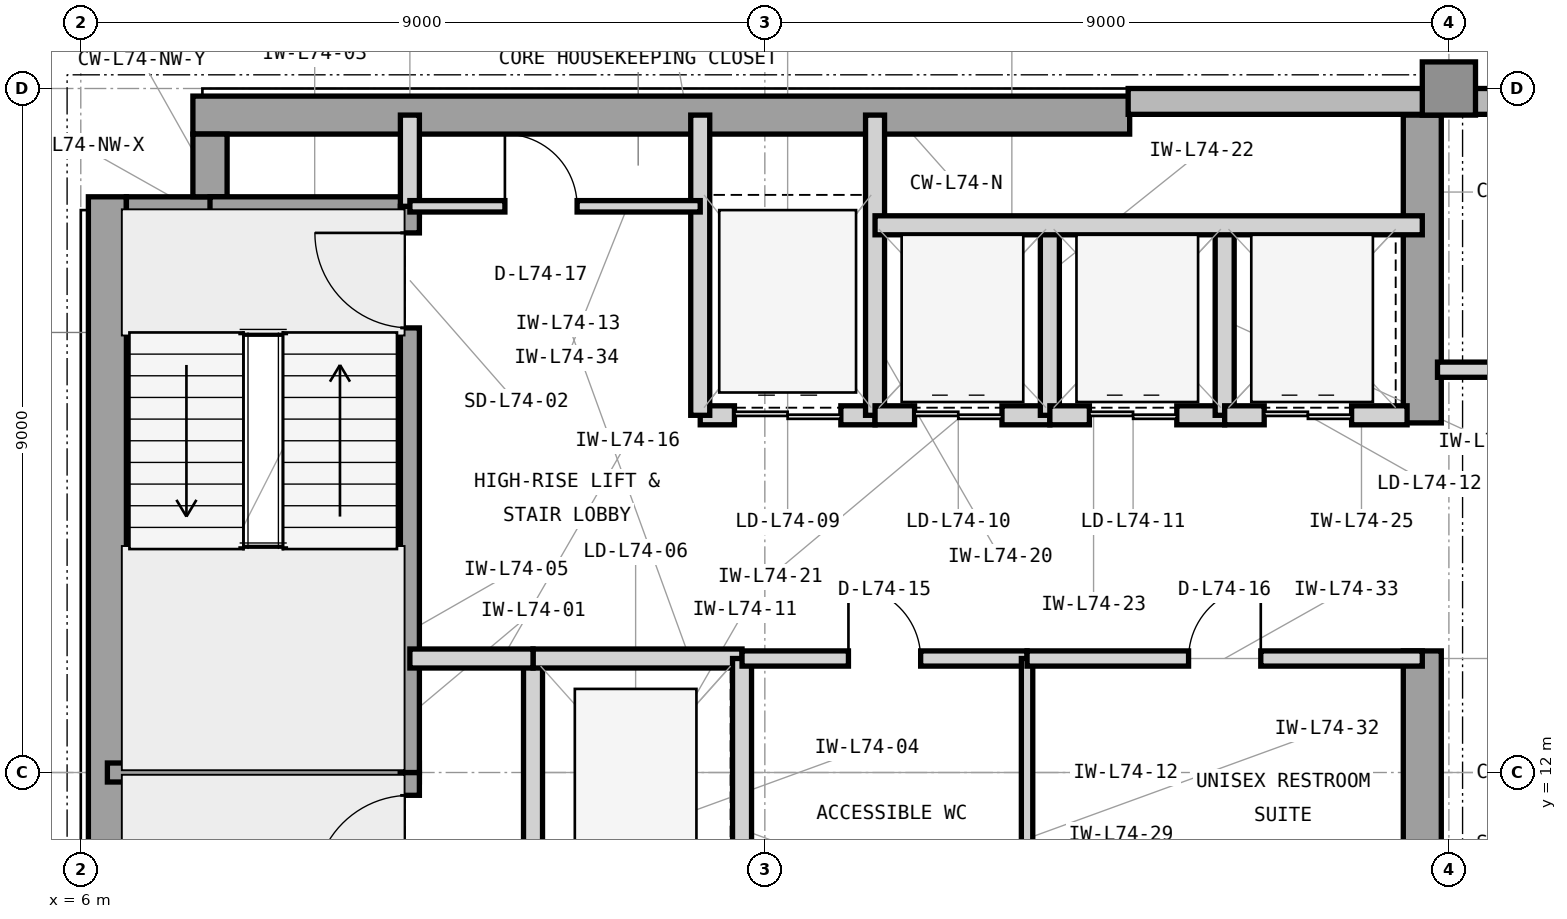
"""IFC4 building model, lengths in metres.
Left out: names, types, materials, properties, quantities, classifications, styles, units other than length and angle.
Written with IfcOpenShell. Run it as: python <this file> out.ifc"""

import sys

from ifc_helpers import new_model, si_unit, direction, frame, frame_2d, origin, origin_2d, place, context, subcontext, project, spatial, rectangle, extrude, element, fill, save


model = new_model("IFC4")
c1 = context("Model", 3, precision=1e-05, world=origin(), true_north=direction((0.0, 1.0)))
c2 = subcontext(c1, "Body", "Model", "MODEL_VIEW")
j1 = project(units=[si_unit("LENGTHUNIT", "METRE"), si_unit("PLANEANGLEUNIT", "RADIAN")], contexts=[c1])
p1 = place(None, origin())
s1 = spatial("IfcSite", under=j1, at=p1, CompositionType="ELEMENT")
p2 = place(p1, origin())
s2 = spatial("IfcBuilding", under=s1, at=p2, CompositionType="ELEMENT")
p3 = place(p2, frame((0.0, 0.0, 301.5)))
s3 = spatial("IfcBuildingStorey", under=s2, at=p3, CompositionType="ELEMENT", Elevation=301.5)
p4 = place(p3, frame((6.35, 4.425, 0.0), z_axis=(0.0, 0.0, 1.0), x_axis=(0.0, 1.0, 0.0)))
e1 = element("IfcWall", 1, at=p4, inside=s3, PredefinedType="SHEAR", context=c2, shape_type="SweptSolid", body=[
    extrude(rectangle(XDim=15.15, YDim=0.5, at=frame_2d((7.575, 0.0))), origin(), (0.0, 0.0, 1.0), 3.9),
])
p5 = place(p3, frame((7.475, 20.65, 0.0), z_axis=(0.0, 0.0, 1.0), x_axis=(1.0, 0.0, 0.0)))
e2 = element("IfcWall", 2, at=p5, inside=s3, PredefinedType="SHEAR", context=c2, shape_type="SweptSolid", body=[
    extrude(rectangle(XDim=12.325, YDim=0.5, at=frame_2d((6.163, 0.0))), origin(), (0.0, 0.0, 1.0), 3.9),
])
p6 = place(p3, frame((23.65, 10.4, 0.0), z_axis=(0.0, 0.0, 1.0), x_axis=(0.0, 1.0, 0.0)))
e3 = element("IfcWall", 3, at=p6, inside=s3, PredefinedType="SHEAR", context=c2, shape_type="SweptSolid", body=[
    extrude(rectangle(XDim=3.2, YDim=0.5, at=frame_2d((1.6, 0.0))), origin(), (0.0, 0.0, 1.0), 3.9),
])
p7 = place(p3, frame((23.65, 16.6, 0.0), z_axis=(0.0, 0.0, 1.0), x_axis=(0.0, 1.0, 0.0)))
e4 = element("IfcWall", 4, at=p7, inside=s3, PredefinedType="SHEAR", context=c2, shape_type="SweptSolid", body=[
    extrude(rectangle(XDim=4.05, YDim=0.5, at=frame_2d((2.025, 0.0))), origin(), (0.0, 0.0, 1.0), 3.9),
])
p8 = place(p3, frame((6.6, 19.35, 0.0), z_axis=(0.0, 0.0, 1.0), x_axis=(1.0, 0.0, 0.0)))
e5 = element("IfcWall", 5, at=p8, inside=s3, PredefinedType="SHEAR", context=c2, shape_type="SweptSolid", body=[
    extrude(rectangle(XDim=1.325, YDim=0.45, at=frame_2d((0.663, 0.0))), origin(), (0.0, 0.0, 1.0), 3.9),
])
p9 = place(p3, frame((7.7, 19.575, 0.0), z_axis=(0.0, 0.0, 1.0), x_axis=(0.0, 1.0, 0.0)))
e6 = element("IfcWall", 6, at=p9, inside=s3, PredefinedType="SHEAR", context=c2, shape_type="SweptSolid", body=[
    extrude(rectangle(XDim=0.825, YDim=0.45, at=frame_2d((0.413, 0.0))), origin(), (0.0, 0.0, 1.0), 3.9),
])
p10 = place(p3, frame((24.0, 21.0, 0.0), z_axis=(0.0, 0.0, 1.0), x_axis=(1.0, 0.0, 0.0)))
e7 = element("IfcColumn", 7, at=p10, inside=s3, PredefinedType="COLUMN", context=c2, shape_type="SweptSolid", body=[
    extrude(rectangle(XDim=0.7, YDim=0.7, at=origin_2d()), origin(), (0.0, 0.0, 1.0), 3.9),
])
p11 = place(p3, frame((49.4, 20.83, 0.0), z_axis=(0.0, 0.0, 1.0), x_axis=(-1.0, 0.0, 0.0)))
e8 = element("IfcWall", 8, at=p11, inside=s3, PredefinedType="STANDARD", context=c2, shape_type="SweptSolid", body=[
    extrude(rectangle(XDim=29.62, YDim=0.34, at=frame_2d((14.81, 0.0))), origin(), (0.0, 0.0, 1.0), 3.715),
])
p12 = place(p11, frame((11.042, 0.0, 0.8)))
e9 = element("IfcOpeningElement", 9, at=p12, cuts=e8, PredefinedType="OPENING", context=c2, shape_type="SweptSolid", body=[
    extrude(rectangle(XDim=2.6, YDim=2.35, at=frame_2d((1.3, 1.175))), frame((0.0, 0.18, 0.0), z_axis=(0.0, -1.0, 0.0), x_axis=(1.0, 0.0, 0.0)), (0.0, 0.0, 1.0), 0.36),
])
p13 = place(p11, frame((20.915, 0.0, 0.8)))
e10 = element("IfcOpeningElement", 10, at=p13, cuts=e8, PredefinedType="OPENING", context=c2, shape_type="SweptSolid", body=[
    extrude(rectangle(XDim=2.6, YDim=2.35, at=frame_2d((1.3, 1.175))), frame((0.0, 0.18, 0.0), z_axis=(0.0, -1.0, 0.0), x_axis=(1.0, 0.0, 0.0)), (0.0, 0.0, 1.0), 0.36),
])
p14 = place(p11, frame((7.925, 0.0, 0.8)))
e11 = element("IfcOpeningElement", 11, at=p14, cuts=e8, PredefinedType="OPENING", context=c2, shape_type="SweptSolid", body=[
    extrude(rectangle(XDim=1.9, YDim=2.35, at=frame_2d((0.95, 1.175))), frame((0.0, 0.18, 0.0), z_axis=(0.0, -1.0, 0.0), x_axis=(1.0, 0.0, 0.0)), (0.0, 0.0, 1.0), 0.36),
])
p15 = place(p3, frame((6.35, 12.0, 0.0), z_axis=(0.0, 0.0, 1.0), x_axis=(1.0, 0.0, 0.0)))
e12 = element("IfcWall", 12, at=p15, inside=s3, PredefinedType="SHEAR", context=c2, shape_type="SweptSolid", body=[
    extrude(rectangle(XDim=4.105, YDim=0.25, at=frame_2d((2.052, 0.0))), origin(), (0.0, 0.0, 1.0), 3.9),
])
p16 = place(p3, frame((7.7, 19.45, 0.0), z_axis=(0.0, 0.0, 1.0), x_axis=(1.0, 0.0, 0.0)))
e13 = element("IfcWall", 13, at=p16, inside=s3, PredefinedType="SHEAR", context=c2, shape_type="SweptSolid", body=[
    extrude(rectangle(XDim=2.755, YDim=0.25, at=frame_2d((1.377, 0.0))), origin(), (0.0, 0.0, 1.0), 3.9),
])
p17 = place(p3, frame((10.33, 4.55, 0.0), z_axis=(0.0, 0.0, 1.0), x_axis=(0.0, 1.0, 0.0)))
e14 = element("IfcWall", 14, at=p17, inside=s3, PredefinedType="SHEAR", context=c2, shape_type="SweptSolid", body=[
    extrude(rectangle(XDim=7.45, YDim=0.25, at=frame_2d((3.725, 0.0))), origin(), (0.0, 0.0, 1.0), 3.9),
])
p18 = place(p17, frame((5.9, 0.0, 0.0)))
e15 = element("IfcOpeningElement", 15, at=p18, cuts=e14, PredefinedType="OPENING", context=c2, shape_type="SweptSolid", body=[
    extrude(rectangle(XDim=1.25, YDim=2.2, at=frame_2d((0.625, 1.1))), frame((0.0, 0.135, 0.0), z_axis=(0.0, -1.0, 0.0), x_axis=(1.0, 0.0, 0.0)), (0.0, 0.0, 1.0), 0.27),
])
p19 = place(p3, frame((10.33, 12.0, 0.0), z_axis=(0.0, 0.0, 1.0), x_axis=(0.0, 1.0, 0.0)))
e16 = element("IfcWall", 16, at=p19, inside=s3, PredefinedType="SHEAR", context=c2, shape_type="SweptSolid", body=[
    extrude(rectangle(XDim=7.45, YDim=0.25, at=frame_2d((3.725, 0.0))), origin(), (0.0, 0.0, 1.0), 3.9),
])
p20 = place(p19, frame((5.85, 0.0, 0.0)))
e17 = element("IfcOpeningElement", 17, at=p20, cuts=e16, PredefinedType="OPENING", context=c2, shape_type="SweptSolid", body=[
    extrude(rectangle(XDim=1.25, YDim=2.2, at=frame_2d((0.625, 1.1))), frame((0.0, 0.135, 0.0), z_axis=(0.0, -1.0, 0.0), x_axis=(1.0, 0.0, 0.0)), (0.0, 0.0, 1.0), 0.27),
])
p21 = place(p3, frame((10.33, 19.45, 0.0), z_axis=(0.0, 0.0, 1.0), x_axis=(0.0, 1.0, 0.0)))
e18 = element("IfcWall", 18, at=p21, inside=s3, PredefinedType="PARTITIONING", context=c2, shape_type="SweptSolid", body=[
    extrude(rectangle(XDim=1.2, YDim=0.25, at=frame_2d((0.6, 0.0))), origin(), (0.0, 0.0, 1.0), 3.705),
])
p22 = place(p3, frame((11.95, 10.5, 0.0), z_axis=(0.0, 0.0, 1.0), x_axis=(0.0, 1.0, 0.0)))
e19 = element("IfcWall", 19, at=p22, inside=s3, PredefinedType="PARTITIONING", context=c2, shape_type="SweptSolid", body=[
    extrude(rectangle(XDim=3.0, YDim=0.25, at=frame_2d((1.5, 0.0))), origin(), (0.0, 0.0, 1.0), 3.705),
])
p23 = place(p3, frame((11.95, 13.5, 0.0), z_axis=(0.0, 0.0, 1.0), x_axis=(1.0, 0.0, 0.0)))
e20 = element("IfcWall", 20, at=p23, inside=s3, PredefinedType="PARTITIONING", context=c2, shape_type="SweptSolid", body=[
    extrude(rectangle(XDim=2.75, YDim=0.25, at=frame_2d((1.375, 0.0))), origin(), (0.0, 0.0, 1.0), 3.354),
])
p24 = place(p3, frame((14.7, 10.5, 0.0), z_axis=(0.0, 0.0, 1.0), x_axis=(0.0, 1.0, 0.0)))
e21 = element("IfcWall", 21, at=p24, inside=s3, PredefinedType="PARTITIONING", context=c2, shape_type="SweptSolid", body=[
    extrude(rectangle(XDim=3.0, YDim=0.25, at=frame_2d((1.5, 0.0))), origin(), (0.0, 0.0, 1.0), 3.705),
])
p25 = place(p3, frame((10.33, 13.5, 0.0), z_axis=(0.0, 0.0, 1.0), x_axis=(1.0, 0.0, 0.0)))
e22 = element("IfcWall", 22, at=p25, inside=s3, PredefinedType="PARTITIONING", context=c2, shape_type="SweptSolid", body=[
    extrude(rectangle(XDim=1.62, YDim=0.25, at=frame_2d((0.81, 0.0))), origin(), (0.0, 0.0, 1.0), 3.354),
])
p26 = place(p3, frame((14.15, 16.7, 0.0), z_axis=(0.0, 0.0, 1.0), x_axis=(1.0, 0.0, 0.0)))
e23 = element("IfcWall", 23, at=p26, inside=s3, PredefinedType="PARTITIONING", context=c2, shape_type="SweptSolid", body=[
    extrude(rectangle(XDim=2.3, YDim=0.25, at=frame_2d((1.15, 0.0))), origin(), (0.0, 0.0, 1.0), 3.354),
])
p27 = place(p26, frame((0.45, 0.0, 0.0)))
e24 = element("IfcOpeningElement", 24, at=p27, cuts=e23, PredefinedType="OPENING", context=c2, shape_type="SweptSolid", body=[
    extrude(rectangle(XDim=1.4, YDim=2.35, at=frame_2d((0.7, 1.175))), frame((0.0, 0.135, 0.0), z_axis=(0.0, -1.0, 0.0), x_axis=(1.0, 0.0, 0.0)), (0.0, 0.0, 1.0), 0.27),
])
for number, where, z_axis, x_axis in (
    (25, (14.15, 16.7, 0.0), (0.0, 0.0, 1.0), (0.0, 1.0, 0.0)),
    (26, (16.45, 16.7, 0.0), (0.0, 0.0, 1.0), (0.0, 1.0, 0.0)),
):
    element("IfcWall", number, at=place(p3, frame(where, z_axis=z_axis, x_axis=x_axis)), inside=s3, PredefinedType="PARTITIONING", context=c2, shape_type="SweptSolid", body=[
        extrude(rectangle(XDim=3.95, YDim=0.25, at=frame_2d((1.975, 0.0))), origin(), (0.0, 0.0, 1.0), 3.705),
    ])
p28 = place(p3, frame((16.45, 16.7, 0.0), z_axis=(0.0, 0.0, 1.0), x_axis=(1.0, 0.0, 0.0)))
e27 = element("IfcWall", 27, at=p28, inside=s3, PredefinedType="PARTITIONING", context=c2, shape_type="SweptSolid", body=[
    extrude(rectangle(XDim=2.3, YDim=0.25, at=frame_2d((1.15, 0.0))), origin(), (0.0, 0.0, 1.0), 3.354),
])
p29 = place(p28, frame((0.52, 0.0, 0.0)))
e28 = element("IfcOpeningElement", 28, at=p29, cuts=e27, PredefinedType="OPENING", context=c2, shape_type="SweptSolid", body=[
    extrude(rectangle(XDim=1.15, YDim=2.25, at=frame_2d((0.575, 1.125))), frame((0.0, 0.135, 0.0), z_axis=(0.0, -1.0, 0.0), x_axis=(1.0, 0.0, 0.0)), (0.0, 0.0, 1.0), 0.27),
])
p30 = place(p3, frame((18.75, 16.7, 0.0), z_axis=(0.0, 0.0, 1.0), x_axis=(0.0, 1.0, 0.0)))
e29 = element("IfcWall", 29, at=p30, inside=s3, PredefinedType="PARTITIONING", context=c2, shape_type="SweptSolid", body=[
    extrude(rectangle(XDim=2.5, YDim=0.25, at=frame_2d((1.25, 0.0))), origin(), (0.0, 0.0, 1.0), 3.705),
])
p31 = place(p3, frame((18.75, 16.7, 0.0), z_axis=(0.0, 0.0, 1.0), x_axis=(1.0, 0.0, 0.0)))
e30 = element("IfcWall", 30, at=p31, inside=s3, PredefinedType="PARTITIONING", context=c2, shape_type="SweptSolid", body=[
    extrude(rectangle(XDim=2.3, YDim=0.25, at=frame_2d((1.15, 0.0))), origin(), (0.0, 0.0, 1.0), 3.354),
])
p32 = place(p31, frame((0.52, 0.0, 0.0)))
e31 = element("IfcOpeningElement", 31, at=p32, cuts=e30, PredefinedType="OPENING", context=c2, shape_type="SweptSolid", body=[
    extrude(rectangle(XDim=1.15, YDim=2.25, at=frame_2d((0.575, 1.125))), frame((0.0, 0.135, 0.0), z_axis=(0.0, -1.0, 0.0), x_axis=(1.0, 0.0, 0.0)), (0.0, 0.0, 1.0), 0.27),
])
p33 = place(p3, frame((21.05, 16.7, 0.0), z_axis=(0.0, 0.0, 1.0), x_axis=(0.0, 1.0, 0.0)))
e32 = element("IfcWall", 32, at=p33, inside=s3, PredefinedType="PARTITIONING", context=c2, shape_type="SweptSolid", body=[
    extrude(rectangle(XDim=2.5, YDim=0.25, at=frame_2d((1.25, 0.0))), origin(), (0.0, 0.0, 1.0), 3.705),
])
p34 = place(p3, frame((21.05, 16.7, 0.0), z_axis=(0.0, 0.0, 1.0), x_axis=(1.0, 0.0, 0.0)))
e33 = element("IfcWall", 33, at=p34, inside=s3, PredefinedType="PARTITIONING", context=c2, shape_type="SweptSolid", body=[
    extrude(rectangle(XDim=2.4, YDim=0.25, at=frame_2d((1.2, 0.0))), origin(), (0.0, 0.0, 1.0), 3.354),
])
p35 = place(p34, frame((0.52, 0.0, 0.0)))
e34 = element("IfcOpeningElement", 34, at=p35, cuts=e33, PredefinedType="OPENING", context=c2, shape_type="SweptSolid", body=[
    extrude(rectangle(XDim=1.15, YDim=2.25, at=frame_2d((0.575, 1.125))), frame((0.0, 0.135, 0.0), z_axis=(0.0, -1.0, 0.0), x_axis=(1.0, 0.0, 0.0)), (0.0, 0.0, 1.0), 0.27),
])
p36 = place(p3, frame((16.45, 19.2, 0.0), z_axis=(0.0, 0.0, 1.0), x_axis=(1.0, 0.0, 0.0)))
e35 = element("IfcWall", 35, at=p36, inside=s3, PredefinedType="PARTITIONING", context=c2, shape_type="SweptSolid", body=[
    extrude(rectangle(XDim=7.2, YDim=0.25, at=frame_2d((3.6, 0.0))), origin(), (0.0, 0.0, 1.0), 3.705),
])
p37 = place(p3, frame((14.7, 13.5, 0.0), z_axis=(0.0, 0.0, 1.0), x_axis=(1.0, 0.0, 0.0)))
e36 = element("IfcWall", 36, at=p37, inside=s3, PredefinedType="PARTITIONING", context=c2, shape_type="SweptSolid", body=[
    extrude(rectangle(XDim=3.75, YDim=0.2, at=frame_2d((1.875, 0.0))), origin(), (0.0, 0.0, 1.0), 3.354),
])
p38 = place(p37, frame((1.4, 0.0, 0.0)))
e37 = element("IfcOpeningElement", 37, at=p38, cuts=e36, PredefinedType="OPENING", context=c2, shape_type="SweptSolid", body=[
    extrude(rectangle(XDim=0.95, YDim=2.1, at=frame_2d((0.475, 1.05))), frame((0.0, 0.11, 0.0), z_axis=(0.0, -1.0, 0.0), x_axis=(1.0, 0.0, 0.0)), (0.0, 0.0, 1.0), 0.22),
])
p39 = place(p3, frame((18.45, 10.34, 0.0), z_axis=(0.0, 0.0, 1.0), x_axis=(0.0, 1.0, 0.0)))
e38 = element("IfcWall", 38, at=p39, inside=s3, PredefinedType="PARTITIONING", context=c2, shape_type="SweptSolid", body=[
    extrude(rectangle(XDim=3.16, YDim=0.15, at=frame_2d((1.58, 0.0))), origin(), (0.0, 0.0, 1.0), 3.705),
])
p40 = place(p3, frame((18.45, 13.5, 0.0), z_axis=(0.0, 0.0, 1.0), x_axis=(1.0, 0.0, 0.0)))
e39 = element("IfcWall", 39, at=p40, inside=s3, PredefinedType="PARTITIONING", context=c2, shape_type="SweptSolid", body=[
    extrude(rectangle(XDim=5.2, YDim=0.2, at=frame_2d((2.6, 0.0))), origin(), (0.0, 0.0, 1.0), 3.354),
])
p41 = place(p40, frame((2.125, 0.0, 0.0)))
e40 = element("IfcOpeningElement", 40, at=p41, cuts=e39, PredefinedType="OPENING", context=c2, shape_type="SweptSolid", body=[
    extrude(rectangle(XDim=0.95, YDim=2.1, at=frame_2d((0.475, 1.05))), frame((0.0, 0.11, 0.0), z_axis=(0.0, -1.0, 0.0), x_axis=(1.0, 0.0, 0.0)), (0.0, 0.0, 1.0), 0.22),
])
p42 = place(p3, frame((10.33, 19.45, 0.0), z_axis=(0.0, 0.0, 1.0), x_axis=(1.0, 0.0, 0.0)))
e41 = element("IfcWall", 41, at=p42, inside=s3, PredefinedType="PARTITIONING", context=c2, shape_type="SweptSolid", body=[
    extrude(rectangle(XDim=3.82, YDim=0.15, at=frame_2d((1.91, 0.0))), origin(), (0.0, 0.0, 1.0), 3.705),
])
p43 = place(p42, frame((1.25, 0.0, 0.0)))
e42 = element("IfcOpeningElement", 42, at=p43, cuts=e41, PredefinedType="OPENING", context=c2, shape_type="SweptSolid", body=[
    extrude(rectangle(XDim=0.95, YDim=2.1, at=frame_2d((0.475, 1.05))), frame((0.0, 0.085, 0.0), z_axis=(0.0, -1.0, 0.0), x_axis=(1.0, 0.0, 0.0)), (0.0, 0.0, 1.0), 0.17),
])
p44 = place(p3, frame((23.85, 17.3, 0.0), z_axis=(0.0, 0.0, 1.0), x_axis=(1.0, 0.0, 0.0)))
e43 = element("IfcWall", 43, at=p44, inside=s3, PredefinedType="PARTITIONING", context=c2, shape_type="SweptSolid", body=[
    extrude(rectangle(XDim=7.35, YDim=0.2, at=frame_2d((3.675, 0.0))), origin(), (0.0, 0.0, 1.0), 3.705),
])
p45 = place(p44, frame((2.8, 0.0, 0.0)))
e44 = element("IfcOpeningElement", 44, at=p45, cuts=e43, PredefinedType="OPENING", context=c2, shape_type="SweptSolid", body=[
    extrude(rectangle(XDim=1.0, YDim=2.15, at=frame_2d((0.5, 1.075))), frame((0.0, 0.11, 0.0), z_axis=(0.0, -1.0, 0.0), x_axis=(1.0, 0.0, 0.0)), (0.0, 0.0, 1.0), 0.22),
])
p46 = place(p18, origin())
e45 = element("IfcDoor", 45, at=p46, inside=s3, OperationType="SINGLE_SWING_LEFT", PredefinedType="DOOR", context=c2, shape_type="SweptSolid", body=[
    extrude(rectangle(XDim=1.25, YDim=2.2, at=frame_2d((0.625, 1.1))), frame((0.0, 0.025, 0.0), z_axis=(0.0, -1.0, 0.0), x_axis=(1.0, 0.0, 0.0)), (0.0, 0.0, 1.0), 0.05),
])
fill(e15, e45)
p47 = place(p20, origin())
e46 = element("IfcDoor", 46, at=p47, inside=s3, OperationType="SINGLE_SWING_RIGHT", PredefinedType="DOOR", context=c2, shape_type="SweptSolid", body=[
    extrude(rectangle(XDim=1.25, YDim=2.2, at=frame_2d((0.625, 1.1))), frame((0.0, 0.025, 0.0), z_axis=(0.0, -1.0, 0.0), x_axis=(1.0, 0.0, 0.0)), (0.0, 0.0, 1.0), 0.05),
])
fill(e17, e46)
p48 = place(p27, origin())
e47 = element("IfcDoor", 47, at=p48, inside=s3, OperationType="DOUBLE_DOOR_SLIDING", PredefinedType="DOOR", context=c2, shape_type="SweptSolid", body=[
    extrude(rectangle(XDim=1.4, YDim=2.35, at=frame_2d((0.7, 1.175))), frame((0.0, 0.025, 0.0), z_axis=(0.0, -1.0, 0.0), x_axis=(1.0, 0.0, 0.0)), (0.0, 0.0, 1.0), 0.05),
])
fill(e24, e47)
p49 = place(p29, origin())
e48 = element("IfcDoor", 48, at=p49, inside=s3, OperationType="DOUBLE_DOOR_SLIDING", PredefinedType="DOOR", context=c2, shape_type="SweptSolid", body=[
    extrude(rectangle(XDim=1.15, YDim=2.25, at=frame_2d((0.575, 1.125))), frame((0.0, 0.025, 0.0), z_axis=(0.0, -1.0, 0.0), x_axis=(1.0, 0.0, 0.0)), (0.0, 0.0, 1.0), 0.05),
])
fill(e28, e48)
p50 = place(p32, origin())
e49 = element("IfcDoor", 49, at=p50, inside=s3, OperationType="DOUBLE_DOOR_SLIDING", PredefinedType="DOOR", context=c2, shape_type="SweptSolid", body=[
    extrude(rectangle(XDim=1.15, YDim=2.25, at=frame_2d((0.575, 1.125))), frame((0.0, 0.025, 0.0), z_axis=(0.0, -1.0, 0.0), x_axis=(1.0, 0.0, 0.0)), (0.0, 0.0, 1.0), 0.05),
])
fill(e31, e49)
p51 = place(p35, origin())
e50 = element("IfcDoor", 50, at=p51, inside=s3, OperationType="DOUBLE_DOOR_SLIDING", PredefinedType="DOOR", context=c2, shape_type="SweptSolid", body=[
    extrude(rectangle(XDim=1.15, YDim=2.25, at=frame_2d((0.575, 1.125))), frame((0.0, 0.025, 0.0), z_axis=(0.0, -1.0, 0.0), x_axis=(1.0, 0.0, 0.0)), (0.0, 0.0, 1.0), 0.05),
])
fill(e34, e50)
p52 = place(p38, origin())
e51 = element("IfcDoor", 51, at=p52, inside=s3, OperationType="SINGLE_SWING_LEFT", PredefinedType="DOOR", context=c2, shape_type="SweptSolid", body=[
    extrude(rectangle(XDim=0.95, YDim=2.1, at=frame_2d((0.475, 1.05))), frame((0.0, 0.025, 0.0), z_axis=(0.0, -1.0, 0.0), x_axis=(1.0, 0.0, 0.0)), (0.0, 0.0, 1.0), 0.05),
])
fill(e37, e51)
p53 = place(p41, origin())
e52 = element("IfcDoor", 52, at=p53, inside=s3, OperationType="SINGLE_SWING_RIGHT", PredefinedType="DOOR", context=c2, shape_type="SweptSolid", body=[
    extrude(rectangle(XDim=0.95, YDim=2.1, at=frame_2d((0.475, 1.05))), frame((0.0, 0.025, 0.0), z_axis=(0.0, -1.0, 0.0), x_axis=(1.0, 0.0, 0.0)), (0.0, 0.0, 1.0), 0.05),
])
fill(e40, e52)
p54 = place(p43, origin())
e53 = element("IfcDoor", 53, at=p54, inside=s3, OperationType="SINGLE_SWING_LEFT", PredefinedType="DOOR", context=c2, shape_type="SweptSolid", body=[
    extrude(rectangle(XDim=0.95, YDim=2.1, at=frame_2d((0.475, 1.05))), frame((0.0, 0.025, 0.0), z_axis=(0.0, -1.0, 0.0), x_axis=(1.0, 0.0, 0.0)), (0.0, 0.0, 1.0), 0.05),
])
fill(e42, e53)
save(model, sys.argv[1])
